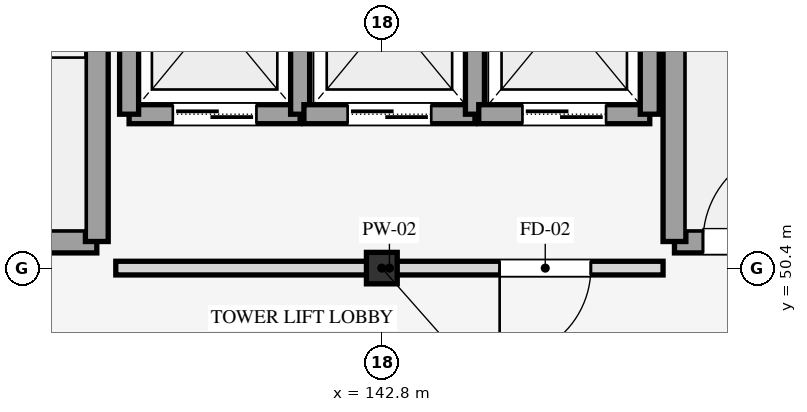
"""IFC4 building model, lengths in metres.
Left out: names, types, materials, properties, quantities, classifications, styles, units other than length and angle.
Written with IfcOpenShell. Run it as: python <this file> out.ifc"""

import sys

from ifc_helpers import new_model, si_unit, direction, frame, frame_2d, origin, origin_2d, place, context, subcontext, project, spatial, rectangle, i_section, extrude, element, fill, save


model = new_model("IFC4")
c1 = context("Model", 3, precision=1e-05, world=origin(), true_north=direction((0.0, 1.0)))
c2 = subcontext(c1, "Body", "Model", "MODEL_VIEW")
j1 = project(units=[si_unit("LENGTHUNIT", "METRE"), si_unit("PLANEANGLEUNIT", "RADIAN")], contexts=[c1])
p1 = place(None, origin())
s1 = spatial("IfcSite", under=j1, at=p1, CompositionType="ELEMENT")
p2 = place(p1, origin())
s2 = spatial("IfcBuilding", under=s1, at=p2, CompositionType="ELEMENT")
p3 = place(p2, frame((0.0, 0.0, 5.4)))
s3 = spatial("IfcBuildingStorey", under=s2, at=p3, CompositionType="ELEMENT", Elevation=5.4)
p4 = place(p3, frame((142.8, 50.4, 0.0), z_axis=(0.0, 0.0, 1.0), x_axis=(1.0, 0.0, 0.0)))
e1 = element("IfcColumn", 1, at=p4, inside=s3, PredefinedType="COLUMN", context=c2, shape_type="SweptSolid", body=[
    extrude(i_section(OverallWidth=0.405, OverallDepth=0.414, WebThickness=0.018, FlangeThickness=0.028, FilletRadius=0.022, at=origin_2d()), origin(), (0.0, 0.0, 1.0), 4.5),
])
p5 = place(p3, frame((135.05, 50.75, 0.0), z_axis=(0.0, 0.0, 1.0), x_axis=(1.0, 0.0, 0.0)))
e2 = element("IfcWall", 2, at=p5, inside=s3, PredefinedType="SHEAR", context=c2, shape_type="SweptSolid", body=[
    extrude(rectangle(XDim=4.0, YDim=0.3, at=frame_2d((2.0, 0.0))), origin(), (0.0, 0.0, 1.0), 4.5),
])
p6 = place(p5, frame((0.375, 0.0, 0.0)))
e3 = element("IfcOpeningElement", 3, at=p6, cuts=e2, PredefinedType="OPENING", context=c2, shape_type="SweptSolid", body=[
    extrude(rectangle(XDim=1.25, YDim=2.15, at=frame_2d((0.625, 1.075))), frame((0.0, 0.16, 0.0), z_axis=(0.0, -1.0, 0.0), x_axis=(1.0, 0.0, 0.0)), (0.0, 0.0, 1.0), 0.32),
])
p7 = place(p3, frame((139.05, 50.75, 0.0), z_axis=(0.0, 0.0, 1.0), x_axis=(0.0, 1.0, 0.0)))
e4 = element("IfcWall", 4, at=p7, inside=s3, PredefinedType="SHEAR", context=c2, shape_type="SweptSolid", body=[
    extrude(rectangle(XDim=14.3, YDim=0.3, at=frame_2d((7.15, 0.0))), origin(), (0.0, 0.0, 1.0), 4.5),
])
p8 = place(p3, frame((146.65, 50.75, 0.0), z_axis=(0.0, 0.0, 1.0), x_axis=(1.0, 0.0, 0.0)))
e5 = element("IfcWall", 5, at=p8, inside=s3, PredefinedType="SHEAR", context=c2, shape_type="SweptSolid", body=[
    extrude(rectangle(XDim=4.0, YDim=0.3, at=frame_2d((2.0, 0.0))), origin(), (0.0, 0.0, 1.0), 4.5),
])
p9 = place(p8, frame((0.375, 0.0, 0.0)))
e6 = element("IfcOpeningElement", 6, at=p9, cuts=e5, PredefinedType="OPENING", context=c2, shape_type="SweptSolid", body=[
    extrude(rectangle(XDim=1.25, YDim=2.15, at=frame_2d((0.625, 1.075))), frame((0.0, 0.16, 0.0), z_axis=(0.0, -1.0, 0.0), x_axis=(1.0, 0.0, 0.0)), (0.0, 0.0, 1.0), 0.32),
])
p10 = place(p3, frame((146.65, 50.75, 0.0), z_axis=(0.0, 0.0, 1.0), x_axis=(0.0, 1.0, 0.0)))
e7 = element("IfcWall", 7, at=p10, inside=s3, PredefinedType="SHEAR", context=c2, shape_type="SweptSolid", body=[
    extrude(rectangle(XDim=14.3, YDim=0.3, at=frame_2d((7.15, 0.0))), origin(), (0.0, 0.0, 1.0), 4.5),
])
p11 = place(p3, frame((139.475, 52.425, 0.0), z_axis=(0.0, 0.0, 1.0), x_axis=(1.0, 0.0, 0.0)))
e8 = element("IfcWall", 8, at=p11, inside=s3, PredefinedType="SHEAR", context=c2, shape_type="SweptSolid", body=[
    extrude(rectangle(XDim=2.25, YDim=0.25, at=frame_2d((1.125, 0.0))), origin(), (0.0, 0.0, 1.0), 4.24),
])
p12 = place(p11, frame((0.575, 0.0, 0.0)))
e9 = element("IfcOpeningElement", 9, at=p12, cuts=e8, PredefinedType="OPENING", context=c2, shape_type="SweptSolid", body=[
    extrude(rectangle(XDim=1.1, YDim=2.15, at=frame_2d((0.55, 1.075))), frame((0.0, 0.135, 0.0), z_axis=(0.0, -1.0, 0.0), x_axis=(1.0, 0.0, 0.0)), (0.0, 0.0, 1.0), 0.27),
])
for number, where, z_axis, x_axis in (
    (10, (139.475, 52.425, 0.0), (0.0, 0.0, 1.0), (0.0, 1.0, 0.0)),
    (11, (141.725, 52.425, 0.0), (0.0, 0.0, 1.0), (0.0, 1.0, 0.0)),
):
    element("IfcWall", number, at=place(p3, frame(where, z_axis=z_axis, x_axis=x_axis)), inside=s3, PredefinedType="SHEAR", context=c2, shape_type="SweptSolid", body=[
        extrude(rectangle(XDim=2.65, YDim=0.25, at=frame_2d((1.325, 0.0))), origin(), (0.0, 0.0, 1.0), 4.24),
    ])
p13 = place(p3, frame((141.775, 52.425, 0.0), z_axis=(0.0, 0.0, 1.0), x_axis=(1.0, 0.0, 0.0)))
e12 = element("IfcWall", 12, at=p13, inside=s3, PredefinedType="SHEAR", context=c2, shape_type="SweptSolid", body=[
    extrude(rectangle(XDim=2.25, YDim=0.25, at=frame_2d((1.125, 0.0))), origin(), (0.0, 0.0, 1.0), 4.24),
])
p14 = place(p13, frame((0.575, 0.0, 0.0)))
e13 = element("IfcOpeningElement", 13, at=p14, cuts=e12, PredefinedType="OPENING", context=c2, shape_type="SweptSolid", body=[
    extrude(rectangle(XDim=1.1, YDim=2.15, at=frame_2d((0.55, 1.075))), frame((0.0, 0.135, 0.0), z_axis=(0.0, -1.0, 0.0), x_axis=(1.0, 0.0, 0.0)), (0.0, 0.0, 1.0), 0.27),
])
p15 = place(p3, frame((144.025, 52.425, 0.0), z_axis=(0.0, 0.0, 1.0), x_axis=(0.0, 1.0, 0.0)))
e14 = element("IfcWall", 14, at=p15, inside=s3, PredefinedType="SHEAR", context=c2, shape_type="SweptSolid", body=[
    extrude(rectangle(XDim=2.65, YDim=0.25, at=frame_2d((1.325, 0.0))), origin(), (0.0, 0.0, 1.0), 4.24),
])
p16 = place(p3, frame((144.075, 52.425, 0.0), z_axis=(0.0, 0.0, 1.0), x_axis=(1.0, 0.0, 0.0)))
e15 = element("IfcWall", 15, at=p16, inside=s3, PredefinedType="SHEAR", context=c2, shape_type="SweptSolid", body=[
    extrude(rectangle(XDim=2.25, YDim=0.25, at=frame_2d((1.125, 0.0))), origin(), (0.0, 0.0, 1.0), 4.24),
])
p17 = place(p16, frame((0.575, 0.0, 0.0)))
e16 = element("IfcOpeningElement", 16, at=p17, cuts=e15, PredefinedType="OPENING", context=c2, shape_type="SweptSolid", body=[
    extrude(rectangle(XDim=1.1, YDim=2.15, at=frame_2d((0.55, 1.075))), frame((0.0, 0.135, 0.0), z_axis=(0.0, -1.0, 0.0), x_axis=(1.0, 0.0, 0.0)), (0.0, 0.0, 1.0), 0.27),
])
p18 = place(p3, frame((146.325, 52.425, 0.0), z_axis=(0.0, 0.0, 1.0), x_axis=(0.0, 1.0, 0.0)))
e17 = element("IfcWall", 17, at=p18, inside=s3, PredefinedType="SHEAR", context=c2, shape_type="SweptSolid", body=[
    extrude(rectangle(XDim=2.65, YDim=0.25, at=frame_2d((1.325, 0.0))), origin(), (0.0, 0.0, 1.0), 4.24),
])
p19 = place(p3, frame((139.3, 50.4, 0.0), z_axis=(0.0, 0.0, 1.0), x_axis=(1.0, 0.0, 0.0)))
e18 = element("IfcWall", 18, at=p19, inside=s3, PredefinedType="PARTITIONING", context=c2, shape_type="SweptSolid", body=[
    extrude(rectangle(XDim=7.2, YDim=0.18, at=frame_2d((3.6, 0.0))), origin(), (0.0, 0.0, 1.0), 3.54),
])
p20 = place(p19, frame((5.05, 0.0, 0.0)))
e19 = element("IfcOpeningElement", 19, at=p20, cuts=e18, PredefinedType="OPENING", context=c2, shape_type="SweptSolid", body=[
    extrude(rectangle(XDim=1.2, YDim=2.15, at=frame_2d((0.6, 1.075))), frame((0.0, 0.1, 0.0), z_axis=(0.0, -1.0, 0.0), x_axis=(1.0, 0.0, 0.0)), (0.0, 0.0, 1.0), 0.2),
])
p21 = place(p9, origin())
e20 = element("IfcDoor", 20, at=p21, inside=s3, OperationType="SINGLE_SWING_RIGHT", PredefinedType="DOOR", context=c2, shape_type="SweptSolid", body=[
    extrude(rectangle(XDim=1.25, YDim=2.15, at=frame_2d((0.625, 1.075))), frame((0.0, 0.025, 0.0), z_axis=(0.0, -1.0, 0.0), x_axis=(1.0, 0.0, 0.0)), (0.0, 0.0, 1.0), 0.05),
])
fill(e6, e20)
p22 = place(p12, origin())
e21 = element("IfcDoor", 21, at=p22, inside=s3, OperationType="DOUBLE_DOOR_SLIDING", PredefinedType="DOOR", context=c2, shape_type="SweptSolid", body=[
    extrude(rectangle(XDim=1.1, YDim=2.15, at=frame_2d((0.55, 1.075))), frame((0.0, 0.025, 0.0), z_axis=(0.0, -1.0, 0.0), x_axis=(1.0, 0.0, 0.0)), (0.0, 0.0, 1.0), 0.05),
])
fill(e9, e21)
p23 = place(p14, origin())
e22 = element("IfcDoor", 22, at=p23, inside=s3, OperationType="DOUBLE_DOOR_SLIDING", PredefinedType="DOOR", context=c2, shape_type="SweptSolid", body=[
    extrude(rectangle(XDim=1.1, YDim=2.15, at=frame_2d((0.55, 1.075))), frame((0.0, 0.025, 0.0), z_axis=(0.0, -1.0, 0.0), x_axis=(1.0, 0.0, 0.0)), (0.0, 0.0, 1.0), 0.05),
])
fill(e13, e22)
p24 = place(p17, origin())
e23 = element("IfcDoor", 23, at=p24, inside=s3, OperationType="DOUBLE_DOOR_SLIDING", PredefinedType="DOOR", context=c2, shape_type="SweptSolid", body=[
    extrude(rectangle(XDim=1.1, YDim=2.15, at=frame_2d((0.55, 1.075))), frame((0.0, 0.025, 0.0), z_axis=(0.0, -1.0, 0.0), x_axis=(1.0, 0.0, 0.0)), (0.0, 0.0, 1.0), 0.05),
])
fill(e16, e23)
p25 = place(p20, frame((1.2, 0.0, 0.0), z_axis=(0.0, 0.0, 1.0), x_axis=(-1.0, 0.0, 0.0)))
e24 = element("IfcDoor", 24, at=p25, inside=s3, OperationType="SINGLE_SWING_RIGHT", PredefinedType="DOOR", context=c2, shape_type="SweptSolid", body=[
    extrude(rectangle(XDim=1.2, YDim=2.15, at=frame_2d((0.6, 1.075))), frame((0.0, 0.025, 0.0), z_axis=(0.0, -1.0, 0.0), x_axis=(1.0, 0.0, 0.0)), (0.0, 0.0, 1.0), 0.05),
])
fill(e19, e24)
save(model, sys.argv[1])
